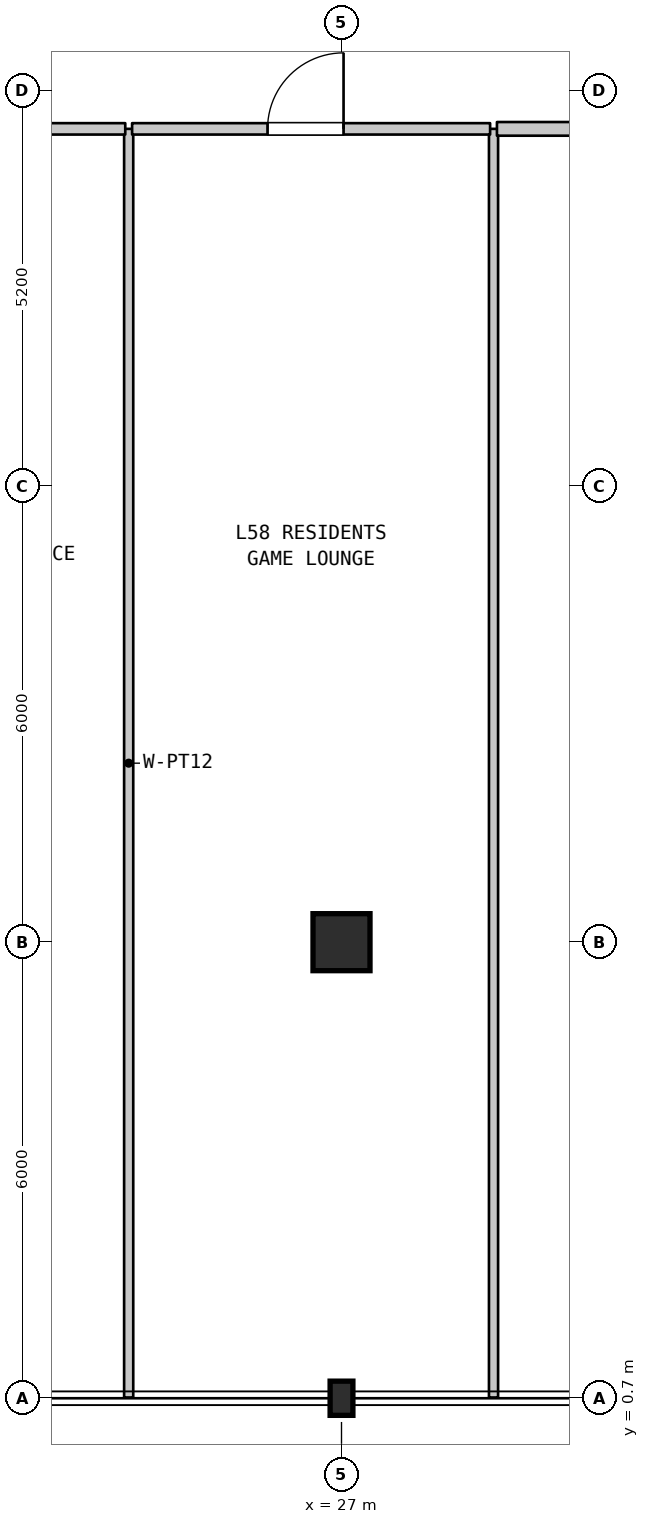
"""IFC4 building model, lengths in metres.
Left out: names, types, materials, properties, quantities, classifications, styles, units other than length and angle.
Written with IfcOpenShell. Run it as: python <this file> out.ifc"""

import sys

from ifc_helpers import new_model, si_unit, direction, frame, frame_2d, origin, origin_2d, place, context, subcontext, project, spatial, rectangle, i_section, extrude, element, fill, save


model = new_model("IFC4")
c1 = context("Model", 3, precision=1e-05, world=origin(), true_north=direction((0.0, 1.0)))
c2 = subcontext(c1, "Body", "Model", "MODEL_VIEW")
j1 = project(units=[si_unit("LENGTHUNIT", "METRE"), si_unit("PLANEANGLEUNIT", "RADIAN")], contexts=[c1])
p1 = place(None, origin())
s1 = spatial("IfcSite", under=j1, at=p1, CompositionType="ELEMENT")
p2 = place(p1, origin())
s2 = spatial("IfcBuilding", under=s1, at=p2, CompositionType="ELEMENT")
p3 = place(p2, frame((0.0, 0.0, 233.9)))
s3 = spatial("IfcBuildingStorey", under=s2, at=p3, CompositionType="ELEMENT", Elevation=233.9)
p4 = place(p3, frame((27.0, 0.7, 0.0), z_axis=(0.0, 0.0, 1.0), x_axis=(1.0, 0.0, 0.0)))
e1 = element("IfcColumn", 1, at=p4, inside=s3, PredefinedType="COLUMN", context=c2, shape_type="SweptSolid", body=[
    extrude(i_section(OverallWidth=0.3, OverallDepth=0.45, WebThickness=0.014, FlangeThickness=0.026, FilletRadius=0.027, at=origin_2d()), origin(), (0.0, 0.0, 1.0), 3.7),
])
p5 = place(p3, frame((27.0, 6.7, 0.0), z_axis=(0.0, 0.0, 1.0), x_axis=(1.0, 0.0, 0.0)))
e2 = element("IfcColumn", 2, at=p5, inside=s3, PredefinedType="COLUMN", context=c2, shape_type="SweptSolid", body=[
    extrude(rectangle(XDim=0.75, YDim=0.75, at=origin_2d()), origin(), (0.0, 0.0, 1.0), 3.7),
])
for number, where, z_axis, x_axis in (
    (3, (24.2, 0.71, 0.0), (0.0, 0.0, 1.0), (0.0, 1.0, 0.0)),
    (4, (29.0, 0.71, 0.0), (0.0, 0.0, 1.0), (0.0, 1.0, 0.0)),
):
    element("IfcWall", number, at=place(p3, frame(where, z_axis=z_axis, x_axis=x_axis)), inside=s3, PredefinedType="PARTITIONING", context=c2, shape_type="SweptSolid", body=[
        extrude(rectangle(XDim=16.69, YDim=0.12, at=frame_2d((8.345, 0.0))), origin(), (0.0, 0.0, 1.0), 3.28),
    ])
p6 = place(p3, frame((20.545, 17.4, 0.0), z_axis=(0.0, 0.0, 1.0), x_axis=(1.0, 0.0, 0.0)))
e5 = element("IfcWall", 5, at=p6, inside=s3, PredefinedType="STANDARD", context=c2, shape_type="SweptSolid", body=[
    extrude(rectangle(XDim=3.61, YDim=0.15, at=frame_2d((1.805, 0.0))), origin(), (0.0, 0.0, 1.0), 3.28),
])
p7 = place(p6, frame((1.305, 0.0, 0.0)))
e6 = element("IfcOpeningElement", 6, at=p7, cuts=e5, PredefinedType="OPENING", context=c2, shape_type="SweptSolid", body=[
    extrude(rectangle(XDim=1.0, YDim=2.15, at=frame_2d((0.5, 1.075))), frame((0.0, 0.085, 0.0), z_axis=(0.0, -1.0, 0.0), x_axis=(1.0, 0.0, 0.0)), (0.0, 0.0, 1.0), 0.17),
])
p8 = place(p3, frame((24.245, 17.4, 0.0), z_axis=(0.0, 0.0, 1.0), x_axis=(1.0, 0.0, 0.0)))
e7 = element("IfcWall", 7, at=p8, inside=s3, PredefinedType="STANDARD", context=c2, shape_type="SweptSolid", body=[
    extrude(rectangle(XDim=4.71, YDim=0.15, at=frame_2d((2.355, 0.0))), origin(), (0.0, 0.0, 1.0), 3.28),
])
p9 = place(p8, frame((1.782, 0.0, 0.0)))
e8 = element("IfcOpeningElement", 8, at=p9, cuts=e7, PredefinedType="OPENING", context=c2, shape_type="SweptSolid", body=[
    extrude(rectangle(XDim=1.0, YDim=2.15, at=frame_2d((0.5, 1.075))), frame((0.0, 0.085, 0.0), z_axis=(0.0, -1.0, 0.0), x_axis=(1.0, 0.0, 0.0)), (0.0, 0.0, 1.0), 0.17),
])
p10 = place(p3, frame((29.045, 17.4, 0.0), z_axis=(0.0, 0.0, 1.0), x_axis=(1.0, 0.0, 0.0)))
e9 = element("IfcWall", 9, at=p10, inside=s3, PredefinedType="STANDARD", context=c2, shape_type="SweptSolid", body=[
    extrude(rectangle(XDim=3.96, YDim=0.18, at=frame_2d((1.98, 0.0))), origin(), (0.0, 0.0, 1.0), 3.28),
])
p11 = place(p10, frame((1.48, 0.0, 0.0)))
e10 = element("IfcOpeningElement", 10, at=p11, cuts=e9, PredefinedType="OPENING", context=c2, shape_type="SweptSolid", body=[
    extrude(rectangle(XDim=1.0, YDim=2.15, at=frame_2d((0.5, 1.075))), frame((0.0, 0.1, 0.0), z_axis=(0.0, -1.0, 0.0), x_axis=(1.0, 0.0, 0.0)), (0.0, 0.0, 1.0), 0.2),
])
p12 = place(p9, origin())
e11 = element("IfcDoor", 11, at=p12, inside=s3, OperationType="SINGLE_SWING_RIGHT", PredefinedType="DOOR", context=c2, shape_type="SweptSolid", body=[
    extrude(rectangle(XDim=1.0, YDim=2.15, at=frame_2d((0.5, 1.075))), frame((0.0, 0.025, 0.0), z_axis=(0.0, -1.0, 0.0), x_axis=(1.0, 0.0, 0.0)), (0.0, 0.0, 1.0), 0.05),
])
fill(e8, e11)
save(model, sys.argv[1])
